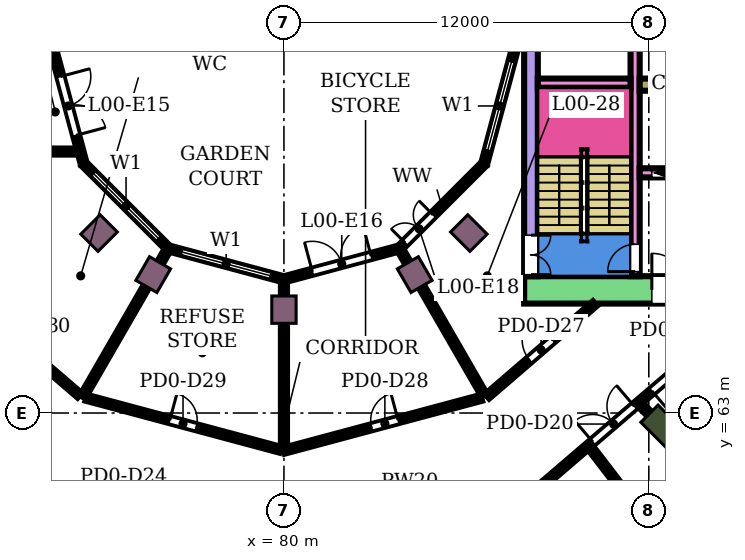
"""IFC4 building model, lengths in metres.
Left out: names, types, materials, properties, quantities, classifications, styles, units other than length and angle.
Written with IfcOpenShell. Run it as: python <this file> out.ifc"""

import sys

from ifc_helpers import new_model, si_unit, direction, frame, frame_2d, origin, origin_2d, place, context, subcontext, project, spatial, rectangle, extrude, element, fill, save


model = new_model("IFC4")
c1 = context("Model", 3, precision=1e-05, world=origin(), true_north=direction((0.0, 1.0)))
c2 = subcontext(c1, "Body", "Model", "MODEL_VIEW")
j1 = project(units=[si_unit("LENGTHUNIT", "METRE"), si_unit("PLANEANGLEUNIT", "RADIAN")], contexts=[c1])
p1 = place(None, origin())
s1 = spatial("IfcSite", under=j1, at=p1, CompositionType="ELEMENT")
p2 = place(p1, origin())
s2 = spatial("IfcBuilding", under=s1, at=p2, CompositionType="ELEMENT")
p3 = place(p2, origin())
s3 = spatial("IfcBuildingStorey", under=s2, at=p3, CompositionType="ELEMENT", Elevation=0.0)
p4 = place(p3, frame((92.445, 62.555, 0.0), z_axis=(0.0, 0.0, 1.0), x_axis=(0.707106781187, -0.707106781187, 0.0)))
e1 = element("IfcColumn", 1, at=p4, inside=s3, PredefinedType="COLUMN", context=c2, shape_type="SweptSolid", body=[
    extrude(rectangle(XDim=1.2, YDim=0.8, at=origin_2d()), origin(), (0.0, 0.0, 1.0), 7.0),
])
for number, where, z_axis, x_axis in (
    (2, (73.919, 68.919, 0.0), (0.0, 0.0, 1.0), (-0.707, -0.707, 0.0)),
    (3, (75.7, 67.552, 0.0), (0.0, 0.0, 1.0), (-0.5, -0.866, 0.0)),
    (4, (80.0, 66.4, 0.0), (0.0, 0.0, 1.0), (0.0, -1.0, 0.0)),
    (5, (84.3, 67.552, 0.0), (0.0, 0.0, 1.0), (0.5, -0.866, 0.0)),
    (6, (86.081, 68.919, 0.0), (0.0, 0.0, 1.0), (0.707, -0.707, 0.0)),
):
    element("IfcColumn", number, at=place(p3, frame(where, z_axis=z_axis, x_axis=x_axis)), inside=s3, PredefinedType="COLUMN", context=c2, shape_type="SweptSolid", body=[
        extrude(rectangle(XDim=0.9, YDim=0.8, at=origin_2d()), origin(), (0.0, 0.0, 1.0), 7.0),
    ])
p5 = place(p3, frame((87.9, 67.05, 0.0), z_axis=(0.0, 0.0, 1.0), x_axis=(1.0, 0.0, 0.0)))
e7 = element("IfcWall", 7, at=p5, inside=s3, PredefinedType="SHEAR", context=c2, shape_type="SweptSolid", body=[
    extrude(rectangle(XDim=14.6, YDim=0.9, at=frame_2d((7.3, 0.0))), origin(), (0.0, 0.0, 1.0), 6.55),
])
p6 = place(p5, frame((4.2, 0.0, 0.0)))
e8 = element("IfcOpeningElement", 8, at=p6, cuts=e7, PredefinedType="OPENING", context=c2, shape_type="SweptSolid", body=[
    extrude(rectangle(XDim=2.4, YDim=2.4, at=frame_2d((1.2, 1.2))), frame((0.0, 0.46, 0.0), z_axis=(0.0, -1.0, 0.0), x_axis=(1.0, 0.0, 0.0)), (0.0, 0.0, 1.0), 0.92),
])
p7 = place(p3, frame((88.125, 67.5, 0.0), z_axis=(0.0, 0.0, 1.0), x_axis=(0.0, 1.0, 0.0)))
e9 = element("IfcWall", 9, at=p7, inside=s3, PredefinedType="SHEAR", context=c2, shape_type="SweptSolid", body=[
    extrude(rectangle(XDim=7.5, YDim=0.45, at=frame_2d((3.75, 0.0))), origin(), (0.0, 0.0, 1.0), 6.55),
])
p8 = place(p7, frame((0.05, 0.0, 0.0)))
e10 = element("IfcOpeningElement", 10, at=p8, cuts=e9, PredefinedType="OPENING", context=c2, shape_type="SweptSolid", body=[
    extrude(rectangle(XDim=1.3, YDim=2.4, at=frame_2d((0.65, 1.2))), frame((0.0, 0.235, 0.0), z_axis=(0.0, -1.0, 0.0), x_axis=(1.0, 0.0, 0.0)), (0.0, 0.0, 1.0), 0.47),
])
p9 = place(p3, frame((91.55, 67.5, 0.0), z_axis=(0.0, 0.0, 1.0), x_axis=(0.0, 1.0, 0.0)))
e11 = element("IfcWall", 11, at=p9, inside=s3, PredefinedType="SHEAR", context=c2, shape_type="SweptSolid", body=[
    extrude(rectangle(XDim=7.5, YDim=0.3, at=frame_2d((3.75, 0.0))), origin(), (0.0, 0.0, 1.0), 6.55),
])
p10 = place(p9, frame((0.15, 0.0, 0.0)))
e12 = element("IfcOpeningElement", 12, at=p10, cuts=e11, PredefinedType="OPENING", context=c2, shape_type="SweptSolid", body=[
    extrude(rectangle(XDim=0.9, YDim=2.1, at=frame_2d((0.45, 1.05))), frame((0.0, 0.16, 0.0), z_axis=(0.0, -1.0, 0.0), x_axis=(1.0, 0.0, 0.0)), (0.0, 0.0, 1.0), 0.32),
])
p11 = place(p3, frame((88.35, 73.85, 0.0), z_axis=(0.0, 0.0, 1.0), x_axis=(1.0, 0.0, 0.0)))
e13 = element("IfcWall", 13, at=p11, inside=s3, PredefinedType="SHEAR", context=c2, shape_type="SweptSolid", body=[
    extrude(rectangle(XDim=3.05, YDim=0.3, at=frame_2d((1.525, 0.0))), origin(), (0.0, 0.0, 1.0), 6.55),
])
p12 = place(p3, frame((91.7, 73.8, 0.0), z_axis=(0.0, 0.0, 1.0), x_axis=(1.0, 0.0, 0.0)))
e14 = element("IfcWall", 14, at=p12, inside=s3, PredefinedType="SHEAR", context=c2, shape_type="SweptSolid", body=[
    extrude(rectangle(XDim=10.8, YDim=0.4, at=frame_2d((5.4, 0.0))), origin(), (0.0, 0.0, 1.0), 6.55),
])
p13 = place(p3, frame((91.7, 70.9, 0.0), z_axis=(0.0, 0.0, 1.0), x_axis=(1.0, 0.0, 0.0)))
e15 = element("IfcWall", 15, at=p13, inside=s3, PredefinedType="SHEAR", context=c2, shape_type="SweptSolid", body=[
    extrude(rectangle(XDim=10.8, YDim=0.3, at=frame_2d((5.4, 0.0))), origin(), (0.0, 0.0, 1.0), 6.55),
])
p14 = place(p13, frame((0.4, 0.0, 0.0)))
e16 = element("IfcOpeningElement", 16, at=p14, cuts=e15, PredefinedType="OPENING", context=c2, shape_type="SweptSolid", body=[
    extrude(rectangle(XDim=1.4, YDim=2.1, at=frame_2d((0.7, 1.05))), frame((0.0, 0.16, 0.0), z_axis=(0.0, -1.0, 0.0), x_axis=(1.0, 0.0, 0.0)), (0.0, 0.0, 1.0), 0.32),
])
p15 = place(p13, frame((3.0, 0.0, 0.0)))
e17 = element("IfcOpeningElement", 17, at=p15, cuts=e15, PredefinedType="OPENING", context=c2, shape_type="SweptSolid", body=[
    extrude(rectangle(XDim=1.2, YDim=2.1, at=frame_2d((0.6, 1.05))), frame((0.0, 0.16, 0.0), z_axis=(0.0, -1.0, 0.0), x_axis=(1.0, 0.0, 0.0)), (0.0, 0.0, 1.0), 0.32),
])
p16 = place(p13, frame((5.4, 0.0, 0.0)))
e18 = element("IfcOpeningElement", 18, at=p16, cuts=e15, PredefinedType="OPENING", context=c2, shape_type="SweptSolid", body=[
    extrude(rectangle(XDim=1.4, YDim=2.1, at=frame_2d((0.7, 1.05))), frame((0.0, 0.16, 0.0), z_axis=(0.0, -1.0, 0.0), x_axis=(1.0, 0.0, 0.0)), (0.0, 0.0, 1.0), 0.32),
])
p17 = place(p13, frame((8.1, 0.0, 0.0)))
e19 = element("IfcOpeningElement", 19, at=p17, cuts=e15, PredefinedType="OPENING", context=c2, shape_type="SweptSolid", body=[
    extrude(rectangle(XDim=1.0, YDim=2.1, at=frame_2d((0.5, 1.05))), frame((0.0, 0.16, 0.0), z_axis=(0.0, -1.0, 0.0), x_axis=(1.0, 0.0, 0.0)), (0.0, 0.0, 1.0), 0.32),
])
p18 = place(p3, frame((72.396, 75.0, 0.0), z_axis=(0.0, 0.0, 1.0), x_axis=(0.258789828301, -0.965933654434, 0.0)))
e20 = element("IfcWall", 20, at=p18, inside=s3, PredefinedType="NOTDEFINED", context=c2, shape_type="SweptSolid", body=[
    extrude(rectangle(XDim=3.936, YDim=0.2, at=frame_2d((1.968, 0.0))), origin(), (0.0, 0.0, 1.0), 7.0),
])
p19 = place(p18, frame((0.968, 0.0, 0.0)))
e21 = element("IfcOpeningElement", 21, at=p19, cuts=e20, PredefinedType="OPENING", context=c2, shape_type="SweptSolid", body=[
    extrude(rectangle(XDim=2.0, YDim=2.4, at=frame_2d((1.0, 1.2))), frame((0.0, 0.11, 0.0), z_axis=(0.0, -1.0, 0.0), x_axis=(1.0, 0.0, 0.0)), (0.0, 0.0, 1.0), 0.22),
])
p20 = place(p3, frame((73.415, 71.198, 0.0), z_axis=(0.0, 0.0, 1.0), x_axis=(0.707106781187, -0.707106781187, 0.0)))
e22 = element("IfcWall", 22, at=p20, inside=s3, PredefinedType="NOTDEFINED", context=c2, shape_type="SweptSolid", body=[
    extrude(rectangle(XDim=3.936, YDim=0.2, at=frame_2d((1.968, 0.0))), origin(), (0.0, 0.0, 1.0), 7.0),
])
p21 = place(p20, frame((0.468, 0.0, 0.9)))
e23 = element("IfcOpeningElement", 23, at=p21, cuts=e22, PredefinedType="OPENING", context=c2, shape_type="SweptSolid", body=[
    extrude(rectangle(XDim=3.0, YDim=2.3, at=frame_2d((1.5, 1.15))), frame((0.0, 0.11, 0.0), z_axis=(0.0, -1.0, 0.0), x_axis=(1.0, 0.0, 0.0)), (0.0, 0.0, 1.0), 0.22),
])
p22 = place(p3, frame((76.198, 68.415, 0.0), z_axis=(0.0, 0.0, 1.0), x_axis=(0.965933654434, -0.258789828301, 0.0)))
e24 = element("IfcWall", 24, at=p22, inside=s3, PredefinedType="NOTDEFINED", context=c2, shape_type="SweptSolid", body=[
    extrude(rectangle(XDim=3.936, YDim=0.2, at=frame_2d((1.968, 0.0))), origin(), (0.0, 0.0, 1.0), 7.0),
])
p23 = place(p22, frame((0.468, 0.0, 0.9)))
e25 = element("IfcOpeningElement", 25, at=p23, cuts=e24, PredefinedType="OPENING", context=c2, shape_type="SweptSolid", body=[
    extrude(rectangle(XDim=3.0, YDim=2.3, at=frame_2d((1.5, 1.15))), frame((0.0, 0.11, 0.0), z_axis=(0.0, -1.0, 0.0), x_axis=(1.0, 0.0, 0.0)), (0.0, 0.0, 1.0), 0.22),
])
p24 = place(p3, frame((80.0, 67.396, 0.0), z_axis=(0.0, 0.0, 1.0), x_axis=(0.965933654434, 0.258789828301, 0.0)))
e26 = element("IfcWall", 26, at=p24, inside=s3, PredefinedType="NOTDEFINED", context=c2, shape_type="SweptSolid", body=[
    extrude(rectangle(XDim=3.936, YDim=0.2, at=frame_2d((1.968, 0.0))), origin(), (0.0, 0.0, 1.0), 7.0),
])
p25 = place(p24, frame((0.968, 0.0, 0.0)))
e27 = element("IfcOpeningElement", 27, at=p25, cuts=e26, PredefinedType="OPENING", context=c2, shape_type="SweptSolid", body=[
    extrude(rectangle(XDim=2.0, YDim=2.4, at=frame_2d((1.0, 1.2))), frame((0.0, 0.11, 0.0), z_axis=(0.0, -1.0, 0.0), x_axis=(1.0, 0.0, 0.0)), (0.0, 0.0, 1.0), 0.22),
])
p26 = place(p3, frame((86.585, 71.198, 0.0), z_axis=(0.0, 0.0, 1.0), x_axis=(0.258789828301, 0.965933654434, 0.0)))
e28 = element("IfcWall", 28, at=p26, inside=s3, PredefinedType="NOTDEFINED", context=c2, shape_type="SweptSolid", body=[
    extrude(rectangle(XDim=3.936, YDim=0.2, at=frame_2d((1.968, 0.0))), origin(), (0.0, 0.0, 1.0), 7.0),
])
p27 = place(p26, frame((0.468, 0.0, 0.9)))
e29 = element("IfcOpeningElement", 29, at=p27, cuts=e28, PredefinedType="OPENING", context=c2, shape_type="SweptSolid", body=[
    extrude(rectangle(XDim=3.0, YDim=2.3, at=frame_2d((1.5, 1.15))), frame((0.0, 0.11, 0.0), z_axis=(0.0, -1.0, 0.0), x_axis=(1.0, 0.0, 0.0)), (0.0, 0.0, 1.0), 0.22),
])
p28 = place(p3, frame((83.802, 68.415, 0.0), z_axis=(0.0, 0.0, 1.0), x_axis=(0.707106781187, 0.707106781187, 0.0)))
e30 = element("IfcWall", 30, at=p28, inside=s3, PredefinedType="NOTDEFINED", context=c2, shape_type="SweptSolid", body=[
    extrude(rectangle(XDim=3.936, YDim=0.2, at=frame_2d((1.968, 0.0))), origin(), (0.0, 0.0, 1.0), 7.0),
])
p29 = place(p28, frame((0.26, 0.0, 0.0)))
e31 = element("IfcOpeningElement", 31, at=p29, cuts=e30, PredefinedType="OPENING", context=c2, shape_type="SweptSolid", body=[
    extrude(rectangle(XDim=1.3, YDim=2.4, at=frame_2d((0.65, 1.2))), frame((0.0, 0.11, 0.0), z_axis=(0.0, -1.0, 0.0), x_axis=(1.0, 0.0, 0.0)), (0.0, 0.0, 1.0), 0.22),
])
p30 = place(p3, frame((69.771, 66.6, 0.0), z_axis=(0.0, 0.0, 1.0), x_axis=(0.758040611529, -0.652207352974, 0.0)))
e32 = element("IfcWall", 32, at=p30, inside=s3, PredefinedType="PARTITIONING", context=c2, shape_type="SweptSolid", body=[
    extrude(rectangle(XDim=4.625, YDim=0.2, at=frame_2d((2.312, 0.0))), origin(), (0.0, 0.0, 1.0), 6.55),
])
p31 = place(p30, frame((1.887, 0.0, 0.0)))
e33 = element("IfcOpeningElement", 33, at=p31, cuts=e32, PredefinedType="OPENING", context=c2, shape_type="SweptSolid", body=[
    extrude(rectangle(XDim=0.9, YDim=2.1, at=frame_2d((0.45, 1.05))), frame((0.0, 0.11, 0.0), z_axis=(0.0, -1.0, 0.0), x_axis=(1.0, 0.0, 0.0)), (0.0, 0.0, 1.0), 0.22),
])
p32 = place(p3, frame((73.499, 63.502, 0.0), z_axis=(0.0, 0.0, 1.0), x_axis=(0.965923617359, -0.258827288799, 0.0)))
e34 = element("IfcWall", 34, at=p32, inside=s3, PredefinedType="PARTITIONING", context=c2, shape_type="SweptSolid", body=[
    extrude(rectangle(XDim=6.601, YDim=0.2, at=frame_2d((3.3, 0.0))), origin(), (0.0, 0.0, 1.0), 6.55),
])
p33 = place(p32, frame((2.844, 0.0, 0.0)))
e35 = element("IfcOpeningElement", 35, at=p33, cuts=e34, PredefinedType="OPENING", context=c2, shape_type="SweptSolid", body=[
    extrude(rectangle(XDim=0.9, YDim=2.1, at=frame_2d((0.45, 1.05))), frame((0.0, 0.11, 0.0), z_axis=(0.0, -1.0, 0.0), x_axis=(1.0, 0.0, 0.0)), (0.0, 0.0, 1.0), 0.22),
])
p34 = place(p3, frame((73.379, 63.534, 0.0), z_axis=(0.0, 0.0, 1.0), x_axis=(0.500033892615, 0.86600583499, 0.0)))
e36 = element("IfcWall", 36, at=p34, inside=s3, PredefinedType="PARTITIONING", context=c2, shape_type="SweptSolid", body=[
    extrude(rectangle(XDim=5.542, YDim=0.2, at=frame_2d((2.771, 0.0))), origin(), (0.0, 0.0, 1.0), 6.55),
])
p35 = place(p3, frame((80.0, 61.89, 0.0), z_axis=(0.0, 0.0, 1.0), x_axis=(0.0, 1.0, 0.0)))
e37 = element("IfcWall", 37, at=p35, inside=s3, PredefinedType="PARTITIONING", context=c2, shape_type="SweptSolid", body=[
    extrude(rectangle(XDim=5.411, YDim=0.2, at=frame_2d((2.706, 0.0))), origin(), (0.0, 0.0, 1.0), 6.55),
])
p36 = place(p3, frame((80.0, 61.76, 0.0), z_axis=(0.0, 0.0, 1.0), x_axis=(0.965932810031, 0.258792980017, 0.0)))
e38 = element("IfcWall", 38, at=p36, inside=s3, PredefinedType="PARTITIONING", context=c2, shape_type="SweptSolid", body=[
    extrude(rectangle(XDim=6.721, YDim=0.2, at=frame_2d((3.36, 0.0))), origin(), (0.0, 0.0, 1.0), 6.55),
])
p37 = place(p36, frame((2.987, 0.0, 0.0)))
e39 = element("IfcOpeningElement", 39, at=p37, cuts=e38, PredefinedType="OPENING", context=c2, shape_type="SweptSolid", body=[
    extrude(rectangle(XDim=0.9, YDim=2.1, at=frame_2d((0.45, 1.05))), frame((0.0, 0.11, 0.0), z_axis=(0.0, -1.0, 0.0), x_axis=(1.0, 0.0, 0.0)), (0.0, 0.0, 1.0), 0.22),
])
p38 = place(p3, frame((83.847, 68.332, 0.0), z_axis=(0.0, 0.0, 1.0), x_axis=(0.499867183387, -0.866102071914, 0.0)))
e40 = element("IfcWall", 40, at=p38, inside=s3, PredefinedType="PARTITIONING", context=c2, shape_type="SweptSolid", body=[
    extrude(rectangle(XDim=5.452, YDim=0.2, at=frame_2d((2.726, 0.0))), origin(), (0.0, 0.0, 1.0), 6.55),
])
p39 = place(p3, frame((86.685, 63.551, 0.0), z_axis=(0.0, 0.0, 1.0), x_axis=(0.758049900748, 0.652196556244, 0.0)))
e41 = element("IfcWall", 41, at=p39, inside=s3, PredefinedType="PARTITIONING", context=c2, shape_type="SweptSolid", body=[
    extrude(rectangle(XDim=4.675, YDim=0.2, at=frame_2d((2.337, 0.0))), origin(), (0.0, 0.0, 1.0), 6.55),
])
p40 = place(p39, frame((1.837, 0.0, 0.0)))
e42 = element("IfcOpeningElement", 42, at=p40, cuts=e41, PredefinedType="OPENING", context=c2, shape_type="SweptSolid", body=[
    extrude(rectangle(XDim=1.0, YDim=2.1, at=frame_2d((0.5, 1.05))), frame((0.0, 0.11, 0.0), z_axis=(0.0, -1.0, 0.0), x_axis=(1.0, 0.0, 0.0)), (0.0, 0.0, 1.0), 0.22),
])
p41 = place(p3, frame((88.434, 60.575, 0.0), z_axis=(0.0, 0.0, 1.0), x_axis=(0.759266619151, 0.650779687024, 0.0)))
e43 = element("IfcWall", 43, at=p41, inside=s3, PredefinedType="PARTITIONING", context=c2, shape_type="SweptSolid", body=[
    extrude(rectangle(XDim=6.882, YDim=0.2, at=frame_2d((3.441, 0.0))), origin(), (0.0, 0.0, 1.0), 6.55),
])
p42 = place(p41, frame((4.835, 0.0, 0.0)))
e44 = element("IfcOpeningElement", 44, at=p42, cuts=e43, PredefinedType="OPENING", context=c2, shape_type="SweptSolid", body=[
    extrude(rectangle(XDim=1.8, YDim=2.1, at=frame_2d((0.9, 1.05))), frame((0.0, 0.11, 0.0), z_axis=(0.0, -1.0, 0.0), x_axis=(1.0, 0.0, 0.0)), (0.0, 0.0, 1.0), 0.22),
])
p43 = place(p41, frame((2.269, 0.0, 0.0)))
e45 = element("IfcOpeningElement", 45, at=p43, cuts=e43, PredefinedType="OPENING", context=c2, shape_type="SweptSolid", body=[
    extrude(rectangle(XDim=1.8, YDim=2.1, at=frame_2d((0.9, 1.05))), frame((0.0, 0.11, 0.0), z_axis=(0.0, -1.0, 0.0), x_axis=(1.0, 0.0, 0.0)), (0.0, 0.0, 1.0), 0.22),
])
p44 = place(p3, frame((90.088, 61.849, 0.0), z_axis=(0.0, 0.0, 1.0), x_axis=(0.608726617775, -0.793380050677, 0.0)))
e46 = element("IfcWall", 46, at=p44, inside=s3, PredefinedType="PARTITIONING", context=c2, shape_type="SweptSolid", body=[
    extrude(rectangle(XDim=13.182, YDim=0.2, at=frame_2d((6.591, 0.0))), origin(), (0.0, 0.0, 1.0), 6.55),
])
p45 = place(p3, frame((91.732, 63.263, 0.0), z_axis=(0.0, 0.0, 1.0), x_axis=(0.706939557171, -0.707273965665, 0.0)))
e47 = element("IfcWall", 47, at=p45, inside=s3, PredefinedType="PARTITIONING", context=c2, shape_type="SweptSolid", body=[
    extrude(rectangle(XDim=29.203, YDim=0.2, at=frame_2d((14.601, 0.0))), origin(), (0.0, 0.0, 1.0), 5.65),
])
p46 = place(p3, frame((73.204, 71.6, 0.0), z_axis=(0.0, 0.0, 1.0), x_axis=(-1.0, 0.0, 0.0)))
e48 = element("IfcWall", 48, at=p46, inside=s3, PredefinedType="PARTITIONING", context=c2, shape_type="SweptSolid", body=[
    extrude(rectangle(XDim=1.104, YDim=0.2, at=frame_2d((0.552, 0.0))), origin(), (0.0, 0.0, 1.0), 6.55),
])
p47 = place(p19, origin())
e49 = element("IfcDoor", 49, at=p47, inside=s3, OperationType="DOUBLE_DOOR_SINGLE_SWING", PredefinedType="DOOR", context=c2, shape_type="SweptSolid", body=[
    extrude(rectangle(XDim=2.0, YDim=2.4, at=frame_2d((1.0, 1.2))), frame((0.0, 0.025, 0.0), z_axis=(0.0, -1.0, 0.0), x_axis=(1.0, 0.0, 0.0)), (0.0, 0.0, 1.0), 0.05),
])
fill(e21, e49)
p48 = place(p21, origin())
e50 = element("IfcWindow", 50, at=p48, inside=s3, PartitioningType="SINGLE_PANEL", PredefinedType="WINDOW", context=c2, shape_type="SweptSolid", body=[
    extrude(rectangle(XDim=3.0, YDim=2.3, at=frame_2d((1.5, 1.15))), frame((0.0, 0.03, 0.0), z_axis=(0.0, -1.0, 0.0), x_axis=(1.0, 0.0, 0.0)), (0.0, 0.0, 1.0), 0.06),
])
fill(e23, e50)
p49 = place(p23, origin())
e51 = element("IfcWindow", 51, at=p49, inside=s3, PartitioningType="SINGLE_PANEL", PredefinedType="WINDOW", context=c2, shape_type="SweptSolid", body=[
    extrude(rectangle(XDim=3.0, YDim=2.3, at=frame_2d((1.5, 1.15))), frame((0.0, 0.03, 0.0), z_axis=(0.0, -1.0, 0.0), x_axis=(1.0, 0.0, 0.0)), (0.0, 0.0, 1.0), 0.06),
])
fill(e25, e51)
p50 = place(p25, origin())
e52 = element("IfcDoor", 52, at=p50, inside=s3, OperationType="DOUBLE_DOOR_SINGLE_SWING", PredefinedType="DOOR", context=c2, shape_type="SweptSolid", body=[
    extrude(rectangle(XDim=2.0, YDim=2.4, at=frame_2d((1.0, 1.2))), frame((0.0, 0.025, 0.0), z_axis=(0.0, -1.0, 0.0), x_axis=(1.0, 0.0, 0.0)), (0.0, 0.0, 1.0), 0.05),
])
fill(e27, e52)
p51 = place(p27, origin())
e53 = element("IfcWindow", 53, at=p51, inside=s3, PartitioningType="SINGLE_PANEL", PredefinedType="WINDOW", context=c2, shape_type="SweptSolid", body=[
    extrude(rectangle(XDim=3.0, YDim=2.3, at=frame_2d((1.5, 1.15))), frame((0.0, 0.03, 0.0), z_axis=(0.0, -1.0, 0.0), x_axis=(1.0, 0.0, 0.0)), (0.0, 0.0, 1.0), 0.06),
])
fill(e29, e53)
p52 = place(p29, origin())
e54 = element("IfcDoor", 54, at=p52, inside=s3, OperationType="DOUBLE_DOOR_SINGLE_SWING", PredefinedType="DOOR", context=c2, shape_type="SweptSolid", body=[
    extrude(rectangle(XDim=1.3, YDim=2.4, at=frame_2d((0.65, 1.2))), frame((0.0, 0.025, 0.0), z_axis=(0.0, -1.0, 0.0), x_axis=(1.0, 0.0, 0.0)), (0.0, 0.0, 1.0), 0.05),
])
fill(e31, e54)
p53 = place(p42, frame((1.8, 0.0, 0.0), z_axis=(0.0, 0.0, 1.0), x_axis=(-1.0, 0.0, 0.0)))
e55 = element("IfcDoor", 55, at=p53, inside=s3, OperationType="DOUBLE_DOOR_SINGLE_SWING", PredefinedType="DOOR", context=c2, shape_type="SweptSolid", body=[
    extrude(rectangle(XDim=1.8, YDim=2.1, at=frame_2d((0.9, 1.05))), frame((0.0, 0.025, 0.0), z_axis=(0.0, -1.0, 0.0), x_axis=(1.0, 0.0, 0.0)), (0.0, 0.0, 1.0), 0.05),
])
fill(e44, e55)
p54 = place(p43, origin())
e56 = element("IfcDoor", 56, at=p54, inside=s3, OperationType="DOUBLE_DOOR_SINGLE_SWING", PredefinedType="DOOR", context=c2, shape_type="SweptSolid", body=[
    extrude(rectangle(XDim=1.8, YDim=2.1, at=frame_2d((0.9, 1.05))), frame((0.0, 0.025, 0.0), z_axis=(0.0, -1.0, 0.0), x_axis=(1.0, 0.0, 0.0)), (0.0, 0.0, 1.0), 0.05),
])
fill(e45, e56)
p55 = place(p40, origin())
e57 = element("IfcDoor", 57, at=p55, inside=s3, OperationType="SINGLE_SWING_RIGHT", PredefinedType="DOOR", context=c2, shape_type="SweptSolid", body=[
    extrude(rectangle(XDim=1.0, YDim=2.1, at=frame_2d((0.5, 1.05))), frame((0.0, 0.025, 0.0), z_axis=(0.0, -1.0, 0.0), x_axis=(1.0, 0.0, 0.0)), (0.0, 0.0, 1.0), 0.05),
])
fill(e42, e57)
p56 = place(p37, origin())
e58 = element("IfcDoor", 58, at=p56, inside=s3, OperationType="SINGLE_SWING_RIGHT", PredefinedType="DOOR", context=c2, shape_type="SweptSolid", body=[
    extrude(rectangle(XDim=0.9, YDim=2.1, at=frame_2d((0.45, 1.05))), frame((0.0, 0.025, 0.0), z_axis=(0.0, -1.0, 0.0), x_axis=(1.0, 0.0, 0.0)), (0.0, 0.0, 1.0), 0.05),
])
fill(e39, e58)
p57 = place(p33, origin())
e59 = element("IfcDoor", 59, at=p57, inside=s3, OperationType="SINGLE_SWING_LEFT", PredefinedType="DOOR", context=c2, shape_type="SweptSolid", body=[
    extrude(rectangle(XDim=0.9, YDim=2.1, at=frame_2d((0.45, 1.05))), frame((0.0, 0.025, 0.0), z_axis=(0.0, -1.0, 0.0), x_axis=(1.0, 0.0, 0.0)), (0.0, 0.0, 1.0), 0.05),
])
fill(e35, e59)
p58 = place(p10, origin())
e60 = element("IfcDoor", 60, at=p58, inside=s3, OperationType="SINGLE_SWING_LEFT", PredefinedType="DOOR", context=c2, shape_type="SweptSolid", body=[
    extrude(rectangle(XDim=0.9, YDim=2.1, at=frame_2d((0.45, 1.05))), frame((0.0, 0.025, 0.0), z_axis=(0.0, -1.0, 0.0), x_axis=(1.0, 0.0, 0.0)), (0.0, 0.0, 1.0), 0.05),
])
fill(e12, e60)
p59 = place(p8, frame((1.3, 0.0, 0.0), z_axis=(0.0, 0.0, 1.0), x_axis=(-1.0, 0.0, 0.0)))
e61 = element("IfcDoor", 61, at=p59, inside=s3, OperationType="DOUBLE_DOOR_SINGLE_SWING", PredefinedType="DOOR", context=c2, shape_type="SweptSolid", body=[
    extrude(rectangle(XDim=1.3, YDim=2.4, at=frame_2d((0.65, 1.2))), frame((0.0, 0.025, 0.0), z_axis=(0.0, -1.0, 0.0), x_axis=(1.0, 0.0, 0.0)), (0.0, 0.0, 1.0), 0.05),
])
fill(e10, e61)
p60 = place(p14, origin())
e62 = element("IfcDoor", 62, at=p60, inside=s3, OperationType="DOUBLE_DOOR_SLIDING", PredefinedType="DOOR", context=c2, shape_type="SweptSolid", body=[
    extrude(rectangle(XDim=1.4, YDim=2.1, at=frame_2d((0.7, 1.05))), frame((0.0, 0.025, 0.0), z_axis=(0.0, -1.0, 0.0), x_axis=(1.0, 0.0, 0.0)), (0.0, 0.0, 1.0), 0.05),
])
fill(e16, e62)
p61 = place(p6, origin())
e63 = element("IfcDoor", 63, at=p61, inside=s3, OperationType="DOUBLE_DOOR_SINGLE_SWING", PredefinedType="DOOR", context=c2, shape_type="SweptSolid", body=[
    extrude(rectangle(XDim=2.4, YDim=2.4, at=frame_2d((1.2, 1.2))), frame((0.0, 0.025, 0.0), z_axis=(0.0, -1.0, 0.0), x_axis=(1.0, 0.0, 0.0)), (0.0, 0.0, 1.0), 0.05),
])
fill(e8, e63)
save(model, sys.argv[1])
